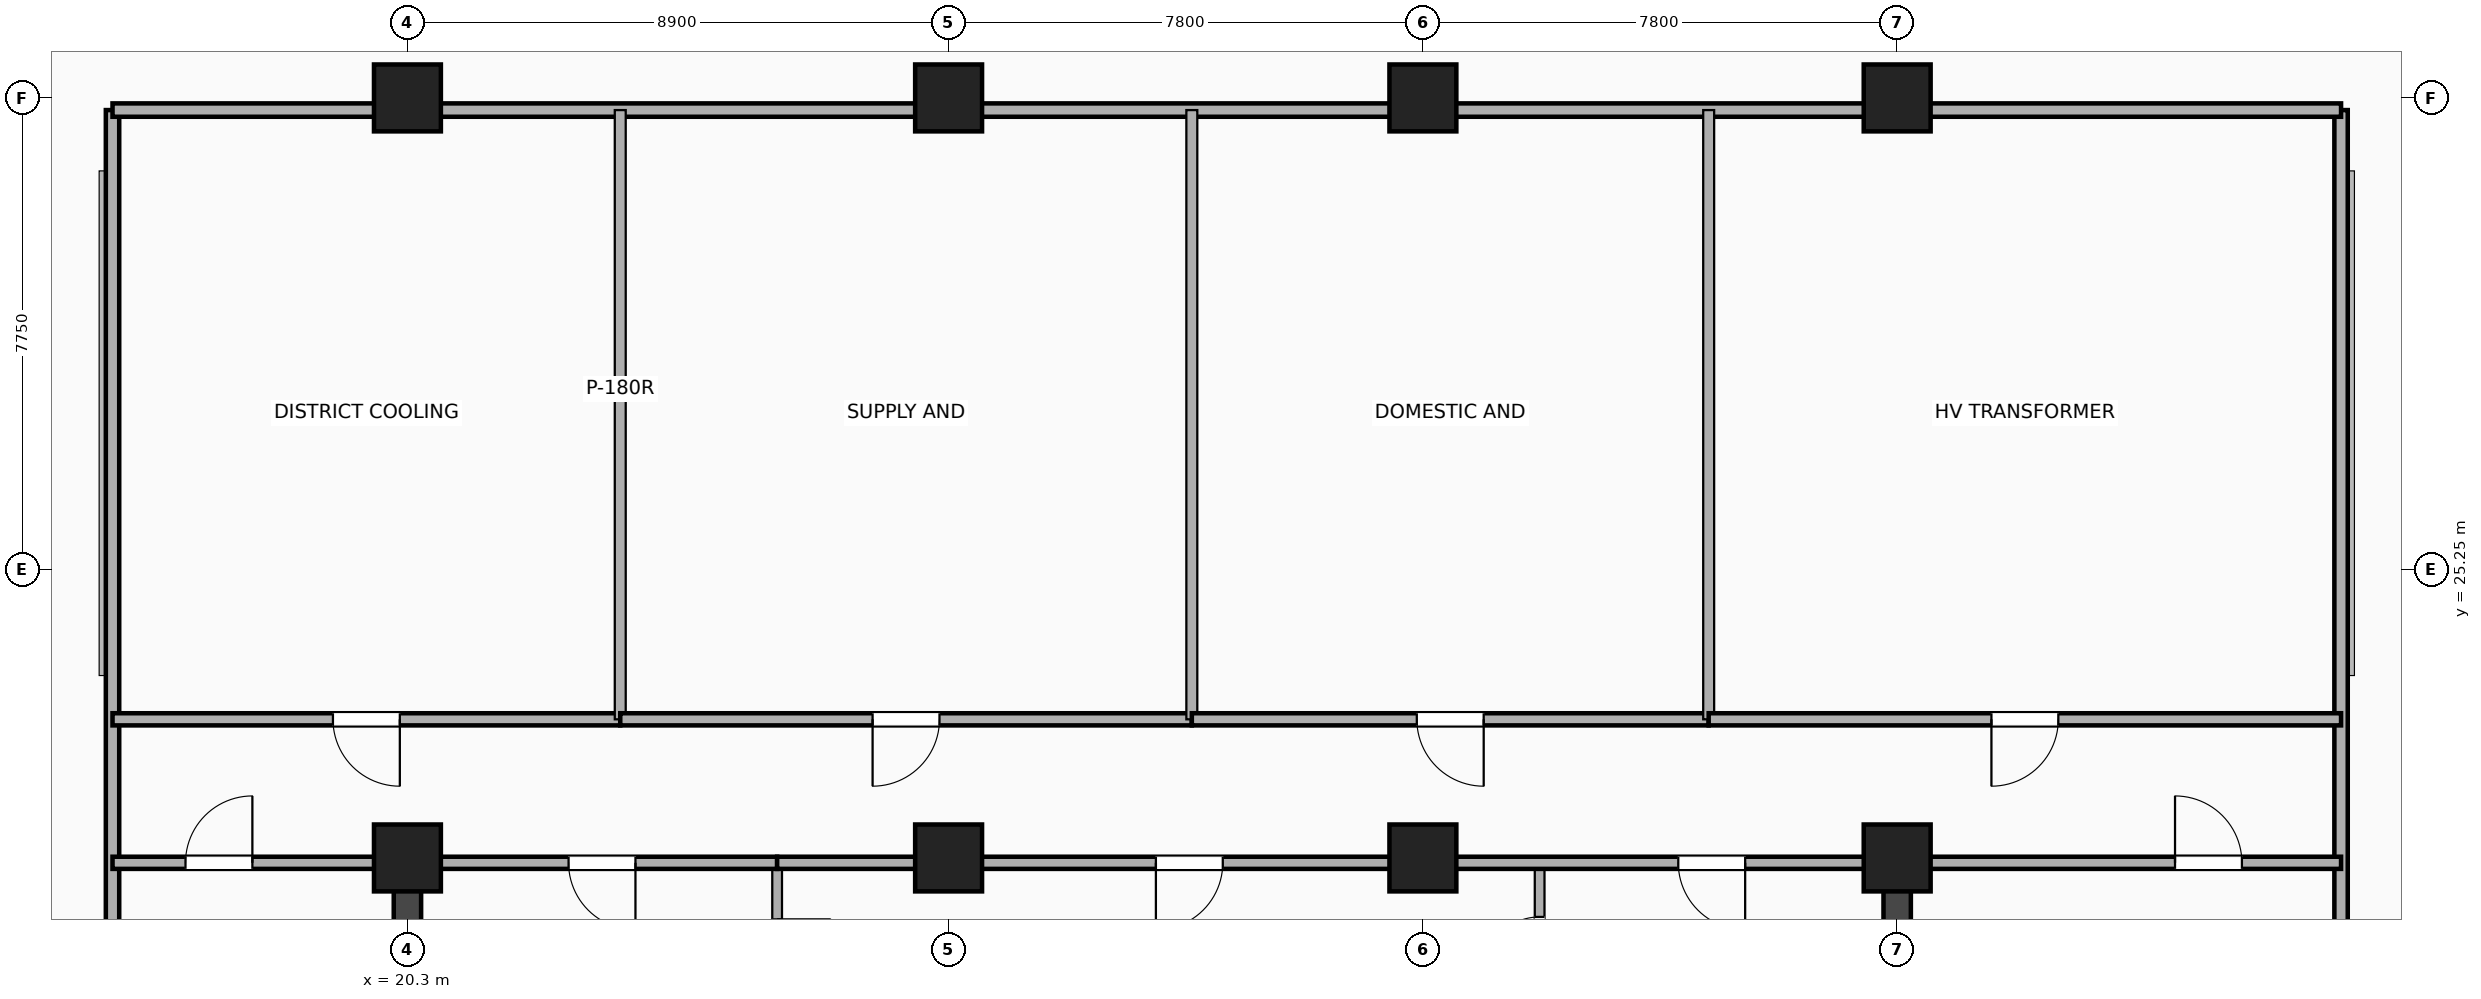
"""IFC4 building model, lengths in metres.
Left out: names, types, materials, properties, quantities, classifications, styles, units other than length and angle.
Written with IfcOpenShell. Run it as: python <this file> out.ifc"""

import sys

from ifc_helpers import new_model, si_unit, direction, frame, frame_2d, origin, origin_2d, place, context, subcontext, project, spatial, rectangle, extrude, element, fill, save


model = new_model("IFC4")
c1 = context("Model", 3, precision=1e-05, world=origin(), true_north=direction((0.0, 1.0)))
c2 = subcontext(c1, "Body", "Model", "MODEL_VIEW")
j1 = project(units=[si_unit("LENGTHUNIT", "METRE"), si_unit("PLANEANGLEUNIT", "RADIAN")], contexts=[c1])
p1 = place(None, origin())
s1 = spatial("IfcSite", under=j1, at=p1, CompositionType="ELEMENT")
p2 = place(p1, origin())
s2 = spatial("IfcBuilding", under=s1, at=p2, CompositionType="ELEMENT")
p3 = place(p2, frame((0.0, 0.0, 184.1)))
s3 = spatial("IfcBuildingStorey", under=s2, at=p3, CompositionType="ELEMENT", Elevation=184.1)
for number, where, z_axis, x_axis in (
    (1, (20.3, 3.5, 0.0), (0.0, 0.0, 1.0), (0.0, 1.0, 0.0)),
    (2, (44.8, 3.5, 0.0), (0.0, 0.0, 1.0), (0.0, 1.0, 0.0)),
):
    element("IfcWall", number, at=place(p3, frame(where, z_axis=z_axis, x_axis=x_axis)), inside=s3, PredefinedType="SHEAR", context=c2, shape_type="SweptSolid", body=[
        extrude(rectangle(XDim=16.9, YDim=0.45, at=frame_2d((8.45, 0.0))), origin(), (0.0, 0.0, 1.0), 8.16),
    ])
for number, where, z_axis, x_axis in (
    (3, (20.3, 20.5, -0.32), (0.0, 0.0, 1.0), (1.0, 0.0, 0.0)),
    (4, (29.2, 20.5, -0.32), (0.0, 0.0, 1.0), (1.0, 0.0, 0.0)),
    (5, (37.0, 20.5, -0.32), (0.0, 0.0, 1.0), (1.0, 0.0, 0.0)),
    (6, (44.8, 20.5, -0.32), (0.0, 0.0, 1.0), (1.0, 0.0, 0.0)),
    (7, (20.3, 33.0, -0.32), (0.0, 0.0, 1.0), (1.0, 0.0, 0.0)),
    (8, (29.2, 33.0, -0.32), (0.0, 0.0, 1.0), (1.0, 0.0, 0.0)),
    (9, (37.0, 33.0, -0.32), (0.0, 0.0, 1.0), (1.0, 0.0, 0.0)),
    (10, (44.8, 33.0, -0.32), (0.0, 0.0, 1.0), (1.0, 0.0, 0.0)),
):
    element("IfcColumn", number, at=place(p3, frame(where, z_axis=z_axis, x_axis=x_axis)), inside=s3, PredefinedType="COLUMN", context=c2, shape_type="SweptSolid", body=[
        extrude(rectangle(XDim=1.1, YDim=1.1, at=origin_2d()), origin(), (0.0, 0.0, 1.0), 8.48),
    ])
p4 = place(p3, frame((26.38, 17.76, 0.0), z_axis=(0.0, 0.0, 1.0), x_axis=(0.0, 1.0, 0.0)))
e11 = element("IfcWall", 11, at=p4, inside=s3, PredefinedType="PARTITIONING", context=c2, shape_type="SweptSolid", body=[
    extrude(rectangle(XDim=2.66, YDim=0.16, at=frame_2d((1.33, 0.0))), origin(), (0.0, 0.0, 1.0), 7.602),
])
p5 = place(p4, frame((0.85, 0.0, 0.0)))
e12 = element("IfcOpeningElement", 12, at=p5, cuts=e11, PredefinedType="OPENING", context=c2, shape_type="SweptSolid", body=[
    extrude(rectangle(XDim=0.88, YDim=2.08, at=frame_2d((0.44, 1.04))), frame((0.0, 0.09, 0.0), z_axis=(0.0, -1.0, 0.0), x_axis=(1.0, 0.0, 0.0)), (0.0, 0.0, 1.0), 0.18),
])
p6 = place(p3, frame((38.92, 17.76, 0.0), z_axis=(0.0, 0.0, 1.0), x_axis=(0.0, 1.0, 0.0)))
e13 = element("IfcWall", 13, at=p6, inside=s3, PredefinedType="PARTITIONING", context=c2, shape_type="SweptSolid", body=[
    extrude(rectangle(XDim=2.66, YDim=0.16, at=frame_2d((1.33, 0.0))), origin(), (0.0, 0.0, 1.0), 7.602),
])
p7 = place(p6, frame((1.77, 0.0, 0.0), z_axis=(0.0, 0.0, 1.0), x_axis=(-1.0, 0.0, 0.0)))
e14 = element("IfcOpeningElement", 14, at=p7, cuts=e13, PredefinedType="OPENING", context=c2, shape_type="SweptSolid", body=[
    extrude(rectangle(XDim=0.92, YDim=2.08, at=frame_2d((0.46, 1.04))), frame((0.0, 0.09, 0.0), z_axis=(0.0, -1.0, 0.0), x_axis=(1.0, 0.0, 0.0)), (0.0, 0.0, 1.0), 0.18),
])
p8 = place(p3, frame((20.65, 20.42, 0.0), z_axis=(0.0, 0.0, 1.0), x_axis=(1.0, 0.0, 0.0)))
e15 = element("IfcWall", 15, at=p8, inside=s3, PredefinedType="PARTITIONING", context=c2, shape_type="SweptSolid", body=[
    extrude(rectangle(XDim=5.73, YDim=0.2, at=frame_2d((2.865, 0.0))), origin(), (0.0, 0.0, 1.0), 7.29),
])
p9 = place(p8, frame((2.3, 0.0, 0.0)))
e16 = element("IfcOpeningElement", 16, at=p9, cuts=e15, PredefinedType="OPENING", context=c2, shape_type="SweptSolid", body=[
    extrude(rectangle(XDim=1.1, YDim=2.15, at=frame_2d((0.55, 1.075))), frame((0.0, 0.11, 0.0), z_axis=(0.0, -1.0, 0.0), x_axis=(1.0, 0.0, 0.0)), (0.0, 0.0, 1.0), 0.22),
])
p10 = place(p3, frame((26.38, 20.42, 0.0), z_axis=(0.0, 0.0, 1.0), x_axis=(1.0, 0.0, 0.0)))
e17 = element("IfcWall", 17, at=p10, inside=s3, PredefinedType="PARTITIONING", context=c2, shape_type="SweptSolid", body=[
    extrude(rectangle(XDim=2.82, YDim=0.2, at=frame_2d((1.41, 0.0))), origin(), (0.0, 0.0, 1.0), 7.29),
])
p11 = place(p3, frame((29.2, 20.42, 0.0), z_axis=(0.0, 0.0, 1.0), x_axis=(1.0, 0.0, 0.0)))
e18 = element("IfcWall", 18, at=p11, inside=s3, PredefinedType="PARTITIONING", context=c2, shape_type="SweptSolid", body=[
    extrude(rectangle(XDim=7.8, YDim=0.2, at=frame_2d((3.9, 0.0))), origin(), (0.0, 0.0, 1.0), 7.29),
])
p12 = place(p11, frame((3.409, 0.0, 0.0)))
e19 = element("IfcOpeningElement", 19, at=p12, cuts=e18, PredefinedType="OPENING", context=c2, shape_type="SweptSolid", body=[
    extrude(rectangle(XDim=1.1, YDim=2.15, at=frame_2d((0.55, 1.075))), frame((0.0, 0.11, 0.0), z_axis=(0.0, -1.0, 0.0), x_axis=(1.0, 0.0, 0.0)), (0.0, 0.0, 1.0), 0.22),
])
p13 = place(p3, frame((37.0, 20.42, 0.0), z_axis=(0.0, 0.0, 1.0), x_axis=(1.0, 0.0, 0.0)))
e20 = element("IfcWall", 20, at=p13, inside=s3, PredefinedType="PARTITIONING", context=c2, shape_type="SweptSolid", body=[
    extrude(rectangle(XDim=7.45, YDim=0.2, at=frame_2d((3.725, 0.0))), origin(), (0.0, 0.0, 1.0), 6.465),
])
p14 = place(p13, frame((4.2, 0.0, 0.0)))
e21 = element("IfcOpeningElement", 21, at=p14, cuts=e20, PredefinedType="OPENING", context=c2, shape_type="SweptSolid", body=[
    extrude(rectangle(XDim=1.1, YDim=2.15, at=frame_2d((0.55, 1.075))), frame((0.0, 0.11, 0.0), z_axis=(0.0, -1.0, 0.0), x_axis=(1.0, 0.0, 0.0)), (0.0, 0.0, 1.0), 0.22),
])
p15 = place(p3, frame((15.45, 12.0, 0.0), z_axis=(0.0, 0.0, 1.0), x_axis=(0.0, 1.0, 0.0)))
e22 = element("IfcWall", 22, at=p15, inside=s3, PredefinedType="PARTITIONING", context=c2, shape_type="SweptSolid", body=[
    extrude(rectangle(XDim=20.8, YDim=0.22, at=frame_2d((10.4, 0.0))), origin(), (0.0, 0.0, 1.0), 7.29),
])
p16 = place(p3, frame((52.1, 12.0, 0.0), z_axis=(0.0, 0.0, 1.0), x_axis=(0.0, 1.0, 0.0)))
e23 = element("IfcWall", 23, at=p16, inside=s3, PredefinedType="PARTITIONING", context=c2, shape_type="SweptSolid", body=[
    extrude(rectangle(XDim=20.8, YDim=0.22, at=frame_2d((10.4, 0.0))), origin(), (0.0, 0.0, 1.0), 6.465),
])
p17 = place(p3, frame((15.45, 32.8, 0.0), z_axis=(0.0, 0.0, 1.0), x_axis=(1.0, 0.0, 0.0)))
e24 = element("IfcWall", 24, at=p17, inside=s3, PredefinedType="PARTITIONING", context=c2, shape_type="SweptSolid", body=[
    extrude(rectangle(XDim=36.65, YDim=0.22, at=frame_2d((18.325, 0.0))), origin(), (0.0, 0.0, 1.0), 6.465),
])
p18 = place(p3, frame((15.45, 20.42, 0.0), z_axis=(0.0, 0.0, 1.0), x_axis=(1.0, 0.0, 0.0)))
e25 = element("IfcWall", 25, at=p18, inside=s3, PredefinedType="PARTITIONING", context=c2, shape_type="SweptSolid", body=[
    extrude(rectangle(XDim=4.85, YDim=0.2, at=frame_2d((2.425, 0.0))), origin(), (0.0, 0.0, 1.0), 7.29),
])
p19 = place(p18, frame((2.3, 0.0, 0.0), z_axis=(0.0, 0.0, 1.0), x_axis=(-1.0, 0.0, 0.0)))
e26 = element("IfcOpeningElement", 26, at=p19, cuts=e25, PredefinedType="OPENING", context=c2, shape_type="SweptSolid", body=[
    extrude(rectangle(XDim=1.1, YDim=2.15, at=frame_2d((0.55, 1.075))), frame((0.0, 0.11, 0.0), z_axis=(0.0, -1.0, 0.0), x_axis=(1.0, 0.0, 0.0)), (0.0, 0.0, 1.0), 0.22),
])
p20 = place(p3, frame((44.8, 20.42, 0.0), z_axis=(0.0, 0.0, 1.0), x_axis=(1.0, 0.0, 0.0)))
e27 = element("IfcWall", 27, at=p20, inside=s3, PredefinedType="PARTITIONING", context=c2, shape_type="SweptSolid", body=[
    extrude(rectangle(XDim=7.3, YDim=0.2, at=frame_2d((3.65, 0.0))), origin(), (0.0, 0.0, 1.0), 6.465),
])
p21 = place(p20, frame((5.669, 0.0, 0.0), z_axis=(0.0, 0.0, 1.0), x_axis=(-1.0, 0.0, 0.0)))
e28 = element("IfcOpeningElement", 28, at=p21, cuts=e27, PredefinedType="OPENING", context=c2, shape_type="SweptSolid", body=[
    extrude(rectangle(XDim=1.1, YDim=2.15, at=frame_2d((0.55, 1.075))), frame((0.0, 0.11, 0.0), z_axis=(0.0, -1.0, 0.0), x_axis=(1.0, 0.0, 0.0)), (0.0, 0.0, 1.0), 0.22),
])
p22 = place(p3, frame((15.45, 22.78, 0.0), z_axis=(0.0, 0.0, 1.0), x_axis=(1.0, 0.0, 0.0)))
e29 = element("IfcWall", 29, at=p22, inside=s3, PredefinedType="PARTITIONING", context=c2, shape_type="SweptSolid", body=[
    extrude(rectangle(XDim=8.35, YDim=0.2, at=frame_2d((4.175, 0.0))), origin(), (0.0, 0.0, 1.0), 7.29),
])
p23 = place(p22, frame((3.625, 0.0, 0.0)))
e30 = element("IfcOpeningElement", 30, at=p23, cuts=e29, PredefinedType="OPENING", context=c2, shape_type="SweptSolid", body=[
    extrude(rectangle(XDim=1.1, YDim=2.15, at=frame_2d((0.55, 1.075))), frame((0.0, 0.11, 0.0), z_axis=(0.0, -1.0, 0.0), x_axis=(1.0, 0.0, 0.0)), (0.0, 0.0, 1.0), 0.22),
])
p24 = place(p3, frame((23.8, 22.78, 0.0), z_axis=(0.0, 0.0, 1.0), x_axis=(0.0, 1.0, 0.0)))
e31 = element("IfcWall", 31, at=p24, inside=s3, PredefinedType="PARTITIONING", context=c2, shape_type="SweptSolid", body=[
    extrude(rectangle(XDim=10.02, YDim=0.18, at=frame_2d((5.01, 0.0))), origin(), (0.0, 0.0, 1.0), 7.602),
])
p25 = place(p3, frame((23.8, 22.78, 0.0), z_axis=(0.0, 0.0, 1.0), x_axis=(1.0, 0.0, 0.0)))
e32 = element("IfcWall", 32, at=p25, inside=s3, PredefinedType="PARTITIONING", context=c2, shape_type="SweptSolid", body=[
    extrude(rectangle(XDim=9.4, YDim=0.2, at=frame_2d((4.7, 0.0))), origin(), (0.0, 0.0, 1.0), 7.29),
])
p26 = place(p25, frame((4.15, 0.0, 0.0)))
e33 = element("IfcOpeningElement", 33, at=p26, cuts=e32, PredefinedType="OPENING", context=c2, shape_type="SweptSolid", body=[
    extrude(rectangle(XDim=1.1, YDim=2.15, at=frame_2d((0.55, 1.075))), frame((0.0, 0.11, 0.0), z_axis=(0.0, -1.0, 0.0), x_axis=(1.0, 0.0, 0.0)), (0.0, 0.0, 1.0), 0.22),
])
p27 = place(p3, frame((33.2, 22.78, 0.0), z_axis=(0.0, 0.0, 1.0), x_axis=(0.0, 1.0, 0.0)))
e34 = element("IfcWall", 34, at=p27, inside=s3, PredefinedType="PARTITIONING", context=c2, shape_type="SweptSolid", body=[
    extrude(rectangle(XDim=10.02, YDim=0.18, at=frame_2d((5.01, 0.0))), origin(), (0.0, 0.0, 1.0), 7.602),
])
p28 = place(p3, frame((33.2, 22.78, 0.0), z_axis=(0.0, 0.0, 1.0), x_axis=(1.0, 0.0, 0.0)))
e35 = element("IfcWall", 35, at=p28, inside=s3, PredefinedType="PARTITIONING", context=c2, shape_type="SweptSolid", body=[
    extrude(rectangle(XDim=8.5, YDim=0.2, at=frame_2d((4.25, 0.0))), origin(), (0.0, 0.0, 1.0), 7.29),
])
p29 = place(p28, frame((3.7, 0.0, 0.0)))
e36 = element("IfcOpeningElement", 36, at=p29, cuts=e35, PredefinedType="OPENING", context=c2, shape_type="SweptSolid", body=[
    extrude(rectangle(XDim=1.1, YDim=2.15, at=frame_2d((0.55, 1.075))), frame((0.0, 0.11, 0.0), z_axis=(0.0, -1.0, 0.0), x_axis=(1.0, 0.0, 0.0)), (0.0, 0.0, 1.0), 0.22),
])
p30 = place(p3, frame((41.7, 22.78, 0.0), z_axis=(0.0, 0.0, 1.0), x_axis=(0.0, 1.0, 0.0)))
e37 = element("IfcWall", 37, at=p30, inside=s3, PredefinedType="PARTITIONING", context=c2, shape_type="SweptSolid", body=[
    extrude(rectangle(XDim=10.02, YDim=0.18, at=frame_2d((5.01, 0.0))), origin(), (0.0, 0.0, 1.0), 7.602),
])
p31 = place(p3, frame((41.7, 22.78, 0.0), z_axis=(0.0, 0.0, 1.0), x_axis=(1.0, 0.0, 0.0)))
e38 = element("IfcWall", 38, at=p31, inside=s3, PredefinedType="PARTITIONING", context=c2, shape_type="SweptSolid", body=[
    extrude(rectangle(XDim=10.4, YDim=0.2, at=frame_2d((5.2, 0.0))), origin(), (0.0, 0.0, 1.0), 7.29),
])
p32 = place(p31, frame((4.65, 0.0, 0.0)))
e39 = element("IfcOpeningElement", 39, at=p32, cuts=e38, PredefinedType="OPENING", context=c2, shape_type="SweptSolid", body=[
    extrude(rectangle(XDim=1.1, YDim=2.15, at=frame_2d((0.55, 1.075))), frame((0.0, 0.11, 0.0), z_axis=(0.0, -1.0, 0.0), x_axis=(1.0, 0.0, 0.0)), (0.0, 0.0, 1.0), 0.22),
])
p33 = place(p7, origin())
e40 = element("IfcDoor", 40, at=p33, inside=s3, OperationType="SINGLE_SWING_LEFT", PredefinedType="DOOR", context=c2, shape_type="SweptSolid", body=[
    extrude(rectangle(XDim=0.92, YDim=2.08, at=frame_2d((0.46, 1.04))), frame((0.0, 0.025, 0.0), z_axis=(0.0, -1.0, 0.0), x_axis=(1.0, 0.0, 0.0)), (0.0, 0.0, 1.0), 0.05),
])
fill(e14, e40)
p34 = place(p9, origin())
e41 = element("IfcDoor", 41, at=p34, inside=s3, OperationType="SINGLE_SWING_RIGHT", PredefinedType="DOOR", context=c2, shape_type="SweptSolid", body=[
    extrude(rectangle(XDim=1.1, YDim=2.15, at=frame_2d((0.55, 1.075))), frame((0.0, 0.025, 0.0), z_axis=(0.0, -1.0, 0.0), x_axis=(1.0, 0.0, 0.0)), (0.0, 0.0, 1.0), 0.05),
])
fill(e16, e41)
p35 = place(p12, origin())
e42 = element("IfcDoor", 42, at=p35, inside=s3, OperationType="SINGLE_SWING_LEFT", PredefinedType="DOOR", context=c2, shape_type="SweptSolid", body=[
    extrude(rectangle(XDim=1.1, YDim=2.15, at=frame_2d((0.55, 1.075))), frame((0.0, 0.025, 0.0), z_axis=(0.0, -1.0, 0.0), x_axis=(1.0, 0.0, 0.0)), (0.0, 0.0, 1.0), 0.05),
])
fill(e19, e42)
p36 = place(p14, origin())
e43 = element("IfcDoor", 43, at=p36, inside=s3, OperationType="SINGLE_SWING_RIGHT", PredefinedType="DOOR", context=c2, shape_type="SweptSolid", body=[
    extrude(rectangle(XDim=1.1, YDim=2.15, at=frame_2d((0.55, 1.075))), frame((0.0, 0.025, 0.0), z_axis=(0.0, -1.0, 0.0), x_axis=(1.0, 0.0, 0.0)), (0.0, 0.0, 1.0), 0.05),
])
fill(e21, e43)
p37 = place(p19, origin())
e44 = element("IfcDoor", 44, at=p37, inside=s3, OperationType="SINGLE_SWING_RIGHT", PredefinedType="DOOR", context=c2, shape_type="SweptSolid", body=[
    extrude(rectangle(XDim=1.1, YDim=2.15, at=frame_2d((0.55, 1.075))), frame((0.0, 0.025, 0.0), z_axis=(0.0, -1.0, 0.0), x_axis=(1.0, 0.0, 0.0)), (0.0, 0.0, 1.0), 0.05),
])
fill(e26, e44)
p38 = place(p21, origin())
e45 = element("IfcDoor", 45, at=p38, inside=s3, OperationType="SINGLE_SWING_LEFT", PredefinedType="DOOR", context=c2, shape_type="SweptSolid", body=[
    extrude(rectangle(XDim=1.1, YDim=2.15, at=frame_2d((0.55, 1.075))), frame((0.0, 0.025, 0.0), z_axis=(0.0, -1.0, 0.0), x_axis=(1.0, 0.0, 0.0)), (0.0, 0.0, 1.0), 0.05),
])
fill(e28, e45)
p39 = place(p23, origin())
e46 = element("IfcDoor", 46, at=p39, inside=s3, OperationType="SINGLE_SWING_RIGHT", PredefinedType="DOOR", context=c2, shape_type="SweptSolid", body=[
    extrude(rectangle(XDim=1.1, YDim=2.15, at=frame_2d((0.55, 1.075))), frame((0.0, 0.025, 0.0), z_axis=(0.0, -1.0, 0.0), x_axis=(1.0, 0.0, 0.0)), (0.0, 0.0, 1.0), 0.05),
])
fill(e30, e46)
p40 = place(p26, origin())
e47 = element("IfcDoor", 47, at=p40, inside=s3, OperationType="SINGLE_SWING_LEFT", PredefinedType="DOOR", context=c2, shape_type="SweptSolid", body=[
    extrude(rectangle(XDim=1.1, YDim=2.15, at=frame_2d((0.55, 1.075))), frame((0.0, 0.025, 0.0), z_axis=(0.0, -1.0, 0.0), x_axis=(1.0, 0.0, 0.0)), (0.0, 0.0, 1.0), 0.05),
])
fill(e33, e47)
p41 = place(p29, origin())
e48 = element("IfcDoor", 48, at=p41, inside=s3, OperationType="SINGLE_SWING_RIGHT", PredefinedType="DOOR", context=c2, shape_type="SweptSolid", body=[
    extrude(rectangle(XDim=1.1, YDim=2.15, at=frame_2d((0.55, 1.075))), frame((0.0, 0.025, 0.0), z_axis=(0.0, -1.0, 0.0), x_axis=(1.0, 0.0, 0.0)), (0.0, 0.0, 1.0), 0.05),
])
fill(e36, e48)
p42 = place(p32, origin())
e49 = element("IfcDoor", 49, at=p42, inside=s3, OperationType="SINGLE_SWING_LEFT", PredefinedType="DOOR", context=c2, shape_type="SweptSolid", body=[
    extrude(rectangle(XDim=1.1, YDim=2.15, at=frame_2d((0.55, 1.075))), frame((0.0, 0.025, 0.0), z_axis=(0.0, -1.0, 0.0), x_axis=(1.0, 0.0, 0.0)), (0.0, 0.0, 1.0), 0.05),
])
fill(e39, e49)
save(model, sys.argv[1])
